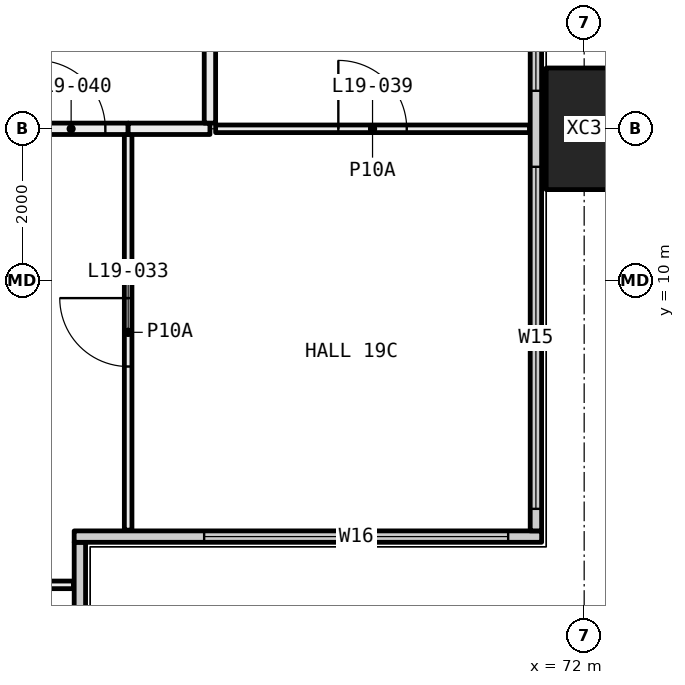
"""IFC4 building model, lengths in metres.
Left out: names, types, materials, properties, quantities, classifications, styles, units other than length and angle.
Written with IfcOpenShell. Run it as: python <this file> out.ifc"""

import sys

from ifc_helpers import new_model, si_unit, direction, frame, frame_2d, origin, origin_2d, place, context, subcontext, project, spatial, rectangle, hollow_rectangle, extrude, element, fill, save


model = new_model("IFC4")
c1 = context("Model", 3, precision=1e-05, world=origin(), true_north=direction((0.0, 1.0)))
c2 = subcontext(c1, "Body", "Model", "MODEL_VIEW")
j1 = project(units=[si_unit("LENGTHUNIT", "METRE"), si_unit("PLANEANGLEUNIT", "RADIAN")], contexts=[c1])
p1 = place(None, origin())
s1 = spatial("IfcSite", under=j1, at=p1, CompositionType="ELEMENT")
p2 = place(p1, origin())
s2 = spatial("IfcBuilding", under=s1, at=p2, CompositionType="ELEMENT")
p3 = place(p2, frame((0.0, 0.0, 78.3)))
s3 = spatial("IfcBuildingStorey", under=s2, at=p3, CompositionType="ELEMENT", Elevation=78.3)
p4 = place(p3, frame((72.0, 12.0, -0.4), z_axis=(0.0, 0.0, 1.0), x_axis=(0.0, 1.0, 0.0)))
e1 = element("IfcColumn", 1, at=p4, inside=s3, PredefinedType="COLUMN", context=c2, shape_type="SweptSolid", body=[
    extrude(hollow_rectangle(XDim=1.6, YDim=1.0, WallThickness=0.065, at=origin_2d()), origin(), (0.0, 0.0, 1.0), 3.45),
])
p5 = place(p3, frame((65.365, 0.71, 0.0), z_axis=(0.0, 0.0, 1.0), x_axis=(0.0, 1.0, 0.0)))
e2 = element("IfcWall", 2, at=p5, inside=s3, PredefinedType="ELEMENTEDWALL", context=c2, shape_type="SweptSolid", body=[
    extrude(rectangle(XDim=5.85, YDim=0.15, at=frame_2d((2.925, 0.0))), origin(), (0.0, 0.0, 1.0), 3.05),
])
p6 = place(p5, frame((0.29, 0.0, 0.45)))
e3 = element("IfcOpeningElement", 3, at=p6, cuts=e2, PredefinedType="OPENING", context=c2, shape_type="SweptSolid", body=[
    extrude(rectangle(XDim=4.0, YDim=2.55, at=frame_2d((2.0, 1.275))), frame((0.0, 0.085, 0.0), z_axis=(0.0, -1.0, 0.0), x_axis=(1.0, 0.0, 0.0)), (0.0, 0.0, 1.0), 0.17),
])
p7 = place(p3, frame((65.29, 6.635, 0.0), z_axis=(0.0, 0.0, 1.0), x_axis=(1.0, 0.0, 0.0)))
e4 = element("IfcWall", 4, at=p7, inside=s3, PredefinedType="ELEMENTEDWALL", context=c2, shape_type="SweptSolid", body=[
    extrude(rectangle(XDim=6.15, YDim=0.15, at=frame_2d((3.075, 0.0))), origin(), (0.0, 0.0, 1.0), 3.05),
])
p8 = place(p7, frame((1.71, 0.0, 0.45)))
e5 = element("IfcOpeningElement", 5, at=p8, cuts=e4, PredefinedType="OPENING", context=c2, shape_type="SweptSolid", body=[
    extrude(rectangle(XDim=4.0, YDim=2.55, at=frame_2d((2.0, 1.275))), frame((0.0, 0.085, 0.0), z_axis=(0.0, -1.0, 0.0), x_axis=(1.0, 0.0, 0.0)), (0.0, 0.0, 1.0), 0.17),
])
p9 = place(p3, frame((71.365, 6.71, 0.0), z_axis=(0.0, 0.0, 1.0), x_axis=(0.0, 1.0, 0.0)))
e6 = element("IfcWall", 6, at=p9, inside=s3, PredefinedType="ELEMENTEDWALL", context=c2, shape_type="SweptSolid", body=[
    extrude(rectangle(XDim=34.58, YDim=0.15, at=frame_2d((17.29, 0.0))), origin(), (0.0, 0.0, 1.0), 3.05),
])
p10 = place(p9, frame((0.29, 0.0, 0.45)))
e7 = element("IfcOpeningElement", 7, at=p10, cuts=e6, PredefinedType="OPENING", context=c2, shape_type="SweptSolid", body=[
    extrude(rectangle(XDim=4.5, YDim=2.55, at=frame_2d((2.25, 1.275))), frame((0.0, 0.085, 0.0), z_axis=(0.0, -1.0, 0.0), x_axis=(1.0, 0.0, 0.0)), (0.0, 0.0, 1.0), 0.17),
])
p11 = place(p9, frame((5.79, 0.0, 0.45)))
e8 = element("IfcOpeningElement", 8, at=p11, cuts=e6, PredefinedType="OPENING", context=c2, shape_type="SweptSolid", body=[
    extrude(rectangle(XDim=3.25, YDim=2.55, at=frame_2d((1.625, 1.275))), frame((0.0, 0.085, 0.0), z_axis=(0.0, -1.0, 0.0), x_axis=(1.0, 0.0, 0.0)), (0.0, 0.0, 1.0), 0.17),
])
p12 = place(p9, frame((13.54, 0.0, 0.45)))
e9 = element("IfcOpeningElement", 9, at=p12, cuts=e6, PredefinedType="OPENING", context=c2, shape_type="SweptSolid", body=[
    extrude(rectangle(XDim=3.25, YDim=2.55, at=frame_2d((1.625, 1.275))), frame((0.0, 0.085, 0.0), z_axis=(0.0, -1.0, 0.0), x_axis=(1.0, 0.0, 0.0)), (0.0, 0.0, 1.0), 0.17),
])
p13 = place(p9, frame((17.79, 0.0, 0.45)))
e10 = element("IfcOpeningElement", 10, at=p13, cuts=e6, PredefinedType="OPENING", context=c2, shape_type="SweptSolid", body=[
    extrude(rectangle(XDim=3.25, YDim=2.55, at=frame_2d((1.625, 1.275))), frame((0.0, 0.085, 0.0), z_axis=(0.0, -1.0, 0.0), x_axis=(1.0, 0.0, 0.0)), (0.0, 0.0, 1.0), 0.17),
])
p14 = place(p9, frame((26.79, 0.0, 0.45)))
e11 = element("IfcOpeningElement", 11, at=p14, cuts=e6, PredefinedType="OPENING", context=c2, shape_type="SweptSolid", body=[
    extrude(rectangle(XDim=2.0, YDim=2.55, at=frame_2d((1.0, 1.275))), frame((0.0, 0.085, 0.0), z_axis=(0.0, -1.0, 0.0), x_axis=(1.0, 0.0, 0.0)), (0.0, 0.0, 1.0), 0.17),
])
p15 = place(p9, frame((29.79, 0.0, 0.45)))
e12 = element("IfcOpeningElement", 12, at=p15, cuts=e6, PredefinedType="OPENING", context=c2, shape_type="SweptSolid", body=[
    extrude(rectangle(XDim=4.5, YDim=2.55, at=frame_2d((2.25, 1.275))), frame((0.0, 0.085, 0.0), z_axis=(0.0, -1.0, 0.0), x_axis=(1.0, 0.0, 0.0)), (0.0, 0.0, 1.0), 0.17),
])
p16 = place(p3, frame((65.28, 6.0, 0.0), z_axis=(0.0, 0.0, 1.0), x_axis=(-1.0, 0.0, 0.0)))
e13 = element("IfcWall", 13, at=p16, inside=s3, PredefinedType="PARTITIONING", context=c2, shape_type="SweptSolid", body=[
    extrude(rectangle(XDim=5.23, YDim=0.1, at=frame_2d((2.615, 0.0))), origin(), (0.0, 0.0, 1.0), 2.45),
])
p17 = place(p3, frame((66.0, 6.72, 0.0), z_axis=(0.0, 0.0, 1.0), x_axis=(0.0, 1.0, 0.0)))
e14 = element("IfcWall", 14, at=p17, inside=s3, PredefinedType="PARTITIONING", context=c2, shape_type="SweptSolid", body=[
    extrude(rectangle(XDim=5.205, YDim=0.1, at=frame_2d((2.603, 0.0))), origin(), (0.0, 0.0, 1.0), 2.45),
])
p18 = place(p17, frame((2.153, 0.0, 0.0)))
e15 = element("IfcOpeningElement", 15, at=p18, cuts=e14, PredefinedType="OPENING", context=c2, shape_type="SweptSolid", body=[
    extrude(rectangle(XDim=0.9, YDim=2.1, at=frame_2d((0.45, 1.05))), frame((0.0, 0.06, 0.0), z_axis=(0.0, -1.0, 0.0), x_axis=(1.0, 0.0, 0.0)), (0.0, 0.0, 1.0), 0.12),
])
p19 = place(p3, frame((66.0, 12.0, 0.0), z_axis=(0.0, 0.0, 1.0), x_axis=(-1.0, 0.0, 0.0)))
e16 = element("IfcWall", 16, at=p19, inside=s3, PredefinedType="PARTITIONING", context=c2, shape_type="SweptSolid", body=[
    extrude(rectangle(XDim=1.5, YDim=0.15, at=frame_2d((0.75, 0.0))), origin(), (0.0, 0.0, 1.0), 2.45),
])
p20 = place(p19, frame((0.3, 0.0, 0.0)))
e17 = element("IfcOpeningElement", 17, at=p20, cuts=e16, PredefinedType="OPENING", context=c2, shape_type="SweptSolid", body=[
    extrude(rectangle(XDim=0.9, YDim=2.1, at=frame_2d((0.45, 1.05))), frame((0.0, 0.085, 0.0), z_axis=(0.0, -1.0, 0.0), x_axis=(1.0, 0.0, 0.0)), (0.0, 0.0, 1.0), 0.17),
])
p21 = place(p3, frame((71.28, 12.0, 0.0), z_axis=(0.0, 0.0, 1.0), x_axis=(-1.0, 0.0, 0.0)))
e18 = element("IfcWall", 18, at=p21, inside=s3, PredefinedType="PARTITIONING", context=c2, shape_type="SweptSolid", body=[
    extrude(rectangle(XDim=4.129, YDim=0.1, at=frame_2d((2.064, 0.0))), origin(), (0.0, 0.0, 1.0), 2.45),
])
p22 = place(p21, frame((1.615, 0.0, 0.0)))
e19 = element("IfcOpeningElement", 19, at=p22, cuts=e18, PredefinedType="OPENING", context=c2, shape_type="SweptSolid", body=[
    extrude(rectangle(XDim=0.9, YDim=2.1, at=frame_2d((0.45, 1.05))), frame((0.0, 0.06, 0.0), z_axis=(0.0, -1.0, 0.0), x_axis=(1.0, 0.0, 0.0)), (0.0, 0.0, 1.0), 0.12),
])
p23 = place(p3, frame((67.076, 12.0, 0.0), z_axis=(0.0, 0.0, 1.0), x_axis=(-1.0, 0.0, 0.0)))
e20 = element("IfcWall", 20, at=p23, inside=s3, PredefinedType="PARTITIONING", context=c2, shape_type="SweptSolid", body=[
    extrude(rectangle(XDim=1.076, YDim=0.15, at=frame_2d((0.538, 0.0))), origin(), (0.0, 0.0, 1.0), 2.45),
])
p24 = place(p3, frame((67.076, 17.9, 0.0), z_axis=(0.0, 0.0, 1.0), x_axis=(0.0, -1.0, 0.0)))
e21 = element("IfcWall", 21, at=p24, inside=s3, PredefinedType="PARTITIONING", context=c2, shape_type="SweptSolid", body=[
    extrude(rectangle(XDim=5.825, YDim=0.15, at=frame_2d((2.913, 0.0))), origin(), (0.0, 0.0, 1.0), 2.45),
])
p25 = place(p8, origin())
e22 = element("IfcWindow", 22, at=p25, inside=s3, PartitioningType="SINGLE_PANEL", PredefinedType="WINDOW", context=c2, shape_type="SweptSolid", body=[
    extrude(rectangle(XDim=4.0, YDim=2.55, at=frame_2d((2.0, 1.275))), frame((0.0, 0.03, 0.0), z_axis=(0.0, -1.0, 0.0), x_axis=(1.0, 0.0, 0.0)), (0.0, 0.0, 1.0), 0.06),
])
fill(e5, e22)
p26 = place(p10, origin())
e23 = element("IfcWindow", 23, at=p26, inside=s3, PartitioningType="SINGLE_PANEL", PredefinedType="WINDOW", context=c2, shape_type="SweptSolid", body=[
    extrude(rectangle(XDim=4.5, YDim=2.55, at=frame_2d((2.25, 1.275))), frame((0.0, 0.03, 0.0), z_axis=(0.0, -1.0, 0.0), x_axis=(1.0, 0.0, 0.0)), (0.0, 0.0, 1.0), 0.06),
])
fill(e7, e23)
p27 = place(p11, origin())
e24 = element("IfcWindow", 24, at=p27, inside=s3, PartitioningType="SINGLE_PANEL", PredefinedType="WINDOW", context=c2, shape_type="SweptSolid", body=[
    extrude(rectangle(XDim=3.25, YDim=2.55, at=frame_2d((1.625, 1.275))), frame((0.0, 0.03, 0.0), z_axis=(0.0, -1.0, 0.0), x_axis=(1.0, 0.0, 0.0)), (0.0, 0.0, 1.0), 0.06),
])
fill(e8, e24)
p28 = place(p18, origin())
e25 = element("IfcDoor", 25, at=p28, inside=s3, OperationType="SINGLE_SWING_LEFT", PredefinedType="DOOR", context=c2, shape_type="SweptSolid", body=[
    extrude(rectangle(XDim=0.9, YDim=2.1, at=frame_2d((0.45, 1.05))), frame((0.0, 0.025, 0.0), z_axis=(0.0, -1.0, 0.0), x_axis=(1.0, 0.0, 0.0)), (0.0, 0.0, 1.0), 0.05),
])
fill(e15, e25)
p29 = place(p22, frame((0.9, 0.0, 0.0), x_axis=(-1.0, 0.0, 0.0)))
e26 = element("IfcDoor", 26, at=p29, inside=s3, OperationType="SINGLE_SWING_RIGHT", PredefinedType="DOOR", context=c2, shape_type="SweptSolid", body=[
    extrude(rectangle(XDim=0.9, YDim=2.1, at=frame_2d((0.45, 1.05))), frame((0.0, 0.025, 0.0), z_axis=(0.0, -1.0, 0.0), x_axis=(1.0, 0.0, 0.0)), (0.0, 0.0, 1.0), 0.05),
])
fill(e19, e26)
p30 = place(p20, frame((0.9, 0.0, 0.0), x_axis=(-1.0, 0.0, 0.0)))
e27 = element("IfcDoor", 27, at=p30, inside=s3, OperationType="SINGLE_SWING_RIGHT", PredefinedType="DOOR", context=c2, shape_type="SweptSolid", body=[
    extrude(rectangle(XDim=0.9, YDim=2.1, at=frame_2d((0.45, 1.05))), frame((0.0, 0.025, 0.0), z_axis=(0.0, -1.0, 0.0), x_axis=(1.0, 0.0, 0.0)), (0.0, 0.0, 1.0), 0.05),
])
fill(e17, e27)
save(model, sys.argv[1])
